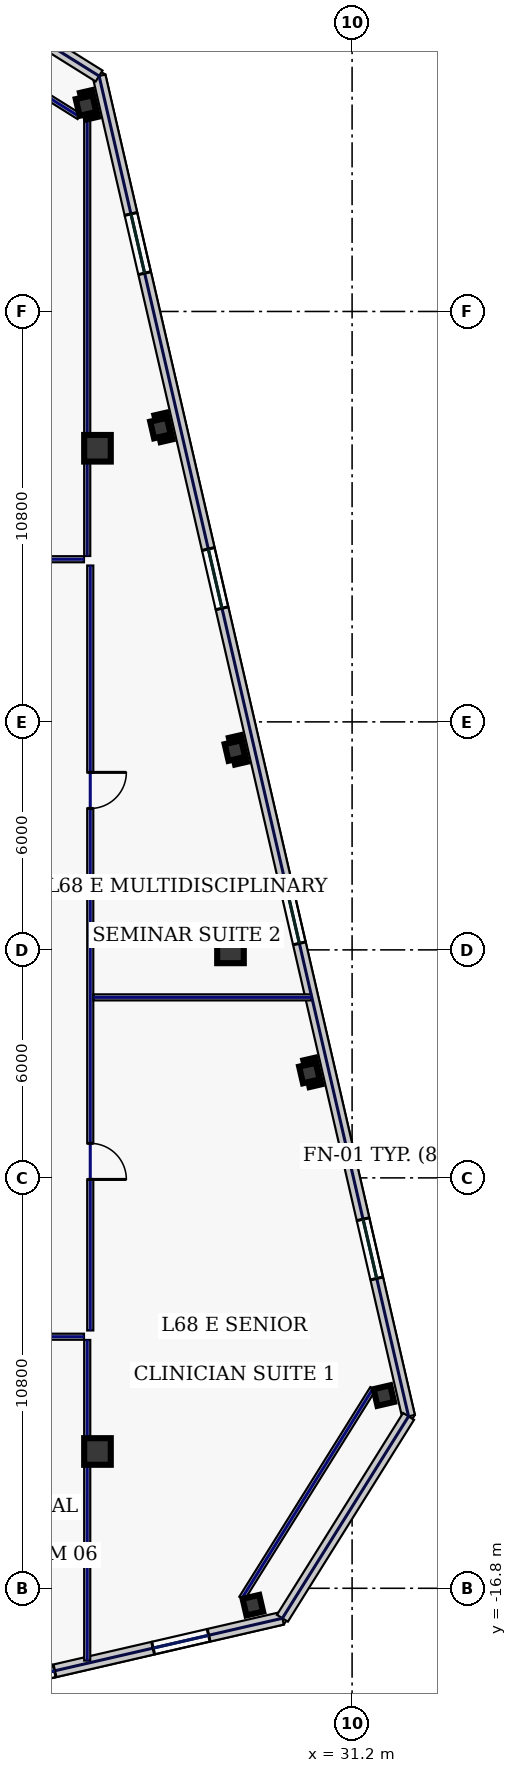
"""IFC4 building model, lengths in metres.
Left out: names, types, materials, properties, quantities, classifications, styles, units other than length and angle.
Written with IfcOpenShell. Run it as: python <this file> out.ifc"""

import sys

from ifc_helpers import new_model, si_unit, direction, frame, frame_2d, origin, origin_2d, place, context, subcontext, project, spatial, rectangle, hollow_rectangle, extrude, element, fill, save


model = new_model("IFC4")
c1 = context("Model", 3, precision=1e-05, world=origin(), true_north=direction((0.0, 1.0)))
c2 = subcontext(c1, "Body", "Model", "MODEL_VIEW")
j1 = project(units=[si_unit("LENGTHUNIT", "METRE"), si_unit("PLANEANGLEUNIT", "RADIAN")], contexts=[c1])
p1 = place(None, origin())
s1 = spatial("IfcSite", under=j1, at=p1, CompositionType="ELEMENT")
p2 = place(p1, origin())
s2 = spatial("IfcBuilding", under=s1, at=p2, CompositionType="ELEMENT")
p3 = place(p2, frame((0.0, 0.0, 293.0)))
s3 = spatial("IfcBuildingStorey", under=s2, at=p3, CompositionType="ELEMENT", Elevation=293.0)
for number, where, z_axis, x_axis in (
    (1, (24.5, -13.2, 0.0), (0.0, 0.0, 1.0), (1.0, 0.0, 0.0)),
    (2, (24.5, 13.2, 0.0), (0.0, 0.0, 1.0), (1.0, 0.0, 0.0)),
    (3, (28.0, 0.0, 0.0), (0.0, 0.0, 1.0), (1.0, 0.0, 0.0)),
):
    element("IfcColumn", number, at=place(p3, frame(where, z_axis=z_axis, x_axis=x_axis)), inside=s3, PredefinedType="COLUMN", context=c2, shape_type="SweptSolid", body=[
        extrude(hollow_rectangle(XDim=0.7, YDim=0.7, WallThickness=0.032, at=origin_2d()), origin(), (0.0, 0.0, 1.0), 3.74),
    ])
for number, where, z_axis, x_axis in (
    (4, (28.589, -17.245, 0.0), (0.0, 0.0, 1.0), (0.974, 0.225, 0.0)),
    (5, (32.036, -11.728, 0.0), (0.0, 0.0, 1.0), (0.974, 0.225, 0.0)),
    (6, (30.077, -3.241, 0.0), (0.0, 0.0, 1.0), (0.974, 0.225, 0.0)),
    (7, (28.117, 5.246, 0.0), (0.0, 0.0, 1.0), (0.974, 0.225, 0.0)),
    (8, (26.158, 13.732, 0.0), (0.0, 0.0, 1.0), (0.974, 0.225, 0.0)),
    (9, (24.198, 22.219, 0.0), (0.0, 0.0, 1.0), (0.974, 0.225, 0.0)),
):
    element("IfcColumn", number, at=place(p3, frame(where, z_axis=z_axis, x_axis=x_axis)), inside=s3, PredefinedType="COLUMN", context=c2, shape_type="SweptSolid", body=[
        extrude(hollow_rectangle(XDim=0.45, YDim=0.45, WallThickness=0.022, at=origin_2d()), origin(), (0.0, 0.0, 1.0), 3.74),
    ])
p4 = place(p3, frame((12.445, -21.495, 0.0), z_axis=(0.0, 0.0, 1.0), x_axis=(0.974369392164, 0.224953967767, 0.0)))
e10 = element("IfcWall", 10, at=p4, inside=s3, PredefinedType="STANDARD", context=c2, shape_type="SweptSolid", body=[
    extrude(rectangle(XDim=17.366, YDim=0.34, at=frame_2d((8.683, 0.0))), origin(), (0.0, 0.0, 1.0), 3.74),
])
p5 = place(p4, frame((2.729, 0.0, 0.9)))
e11 = element("IfcOpeningElement", 11, at=p5, cuts=e10, PredefinedType="OPENING", context=c2, shape_type="SweptSolid", body=[
    extrude(rectangle(XDim=1.5, YDim=2.0, at=frame_2d((0.75, 1.0))), frame((0.0, 0.18, 0.0), z_axis=(0.0, -1.0, 0.0), x_axis=(1.0, 0.0, 0.0)), (0.0, 0.0, 1.0), 0.36),
])
p6 = place(p4, frame((6.24, 0.0, 0.9)))
e12 = element("IfcOpeningElement", 12, at=p6, cuts=e10, PredefinedType="OPENING", context=c2, shape_type="SweptSolid", body=[
    extrude(rectangle(XDim=1.5, YDim=2.0, at=frame_2d((0.75, 1.0))), frame((0.0, 0.18, 0.0), z_axis=(0.0, -1.0, 0.0), x_axis=(1.0, 0.0, 0.0)), (0.0, 0.0, 1.0), 0.36),
])
p7 = place(p4, frame((10.363, 0.0, 0.9)))
e13 = element("IfcOpeningElement", 13, at=p7, cuts=e10, PredefinedType="OPENING", context=c2, shape_type="SweptSolid", body=[
    extrude(rectangle(XDim=0.85, YDim=1.85, at=frame_2d((0.425, 0.925))), frame((0.0, 0.18, 0.0), z_axis=(0.0, -1.0, 0.0), x_axis=(1.0, 0.0, 0.0)), (0.0, 0.0, 1.0), 0.36),
])
p8 = place(p4, frame((13.875, 0.0, 0.9)))
e14 = element("IfcOpeningElement", 14, at=p8, cuts=e10, PredefinedType="OPENING", context=c2, shape_type="SweptSolid", body=[
    extrude(rectangle(XDim=1.5, YDim=2.0, at=frame_2d((0.75, 1.0))), frame((0.0, 0.18, 0.0), z_axis=(0.0, -1.0, 0.0), x_axis=(1.0, 0.0, 0.0)), (0.0, 0.0, 1.0), 0.36),
])
p9 = place(p3, frame((32.686, -12.276, 0.0), z_axis=(0.0, 0.0, 1.0), x_axis=(-0.224953091034, 0.974369594576, 0.0)))
e15 = element("IfcWall", 15, at=p9, inside=s3, PredefinedType="STANDARD", context=c2, shape_type="SweptSolid", body=[
    extrude(rectangle(XDim=36.2, YDim=0.34, at=frame_2d((18.1, 0.0))), origin(), (0.0, 0.0, 1.0), 3.74),
])
p10 = place(p9, frame((3.725, 0.0, 0.58)))
e16 = element("IfcOpeningElement", 16, at=p10, cuts=e15, PredefinedType="OPENING", context=c2, shape_type="SweptSolid", body=[
    extrude(rectangle(XDim=1.6, YDim=2.3, at=frame_2d((0.8, 1.15))), frame((0.0, 0.18, 0.0), z_axis=(0.0, -1.0, 0.0), x_axis=(1.0, 0.0, 0.0)), (0.0, 0.0, 1.0), 0.36),
])
p11 = place(p9, frame((12.775, 0.0, 0.58)))
e17 = element("IfcOpeningElement", 17, at=p11, cuts=e15, PredefinedType="OPENING", context=c2, shape_type="SweptSolid", body=[
    extrude(rectangle(XDim=1.6, YDim=2.3, at=frame_2d((0.8, 1.15))), frame((0.0, 0.18, 0.0), z_axis=(0.0, -1.0, 0.0), x_axis=(1.0, 0.0, 0.0)), (0.0, 0.0, 1.0), 0.36),
])
p12 = place(p9, frame((21.825, 0.0, 0.58)))
e18 = element("IfcOpeningElement", 18, at=p12, cuts=e15, PredefinedType="OPENING", context=c2, shape_type="SweptSolid", body=[
    extrude(rectangle(XDim=1.6, YDim=2.3, at=frame_2d((0.8, 1.15))), frame((0.0, 0.18, 0.0), z_axis=(0.0, -1.0, 0.0), x_axis=(1.0, 0.0, 0.0)), (0.0, 0.0, 1.0), 0.36),
])
p13 = place(p9, frame((30.875, 0.0, 0.58)))
e19 = element("IfcOpeningElement", 19, at=p13, cuts=e15, PredefinedType="OPENING", context=c2, shape_type="SweptSolid", body=[
    extrude(rectangle(XDim=1.6, YDim=2.3, at=frame_2d((0.8, 1.15))), frame((0.0, 0.18, 0.0), z_axis=(0.0, -1.0, 0.0), x_axis=(1.0, 0.0, 0.0)), (0.0, 0.0, 1.0), 0.36),
])
for number, where, z_axis, x_axis in (
    (20, (29.366, -17.589, 0.0), (0.0, 0.0, 1.0), (0.53, 0.848, 0.0)),
    (21, (24.542, 22.996, 0.0), (0.0, 0.0, 1.0), (-0.848, 0.53, 0.0)),
):
    element("IfcWall", number, at=place(p3, frame(where, z_axis=z_axis, x_axis=x_axis)), inside=s3, PredefinedType="STANDARD", context=c2, shape_type="SweptSolid", body=[
        extrude(rectangle(XDim=6.265, YDim=0.34, at=frame_2d((3.132, 0.0))), origin(), (0.0, 0.0, 1.0), 3.74),
    ])
for number, where, z_axis, x_axis in (
    (22, (28.3, -17.065, 0.0), (0.0, 0.0, 1.0), (0.53, 0.848, 0.0)),
    (23, (24.018, 21.931, 0.0), (0.0, 0.0, 1.0), (-0.848, 0.53, 0.0)),
):
    element("IfcWall", number, at=place(p3, frame(where, z_axis=z_axis, x_axis=x_axis)), inside=s3, PredefinedType="PARTITIONING", context=c2, shape_type="SweptSolid", body=[
        extrude(rectangle(XDim=6.505, YDim=0.16, at=frame_2d((3.253, 0.0))), origin(), (0.0, 0.0, 1.0), 3.74),
    ])
p14 = place(p3, frame((-24.145, 10.28, 0.0), z_axis=(0.0, 0.0, 1.0), x_axis=(1.0, 0.0, 0.0)))
e24 = element("IfcWall", 24, at=p14, inside=s3, PredefinedType="PARTITIONING", context=c2, shape_type="SweptSolid", body=[
    extrude(rectangle(XDim=48.29, YDim=0.16, at=frame_2d((24.145, 0.0))), origin(), (0.0, 0.0, 1.0), 3.74),
])
p15 = place(p14, frame((2.044, 0.0, 0.0)))
e25 = element("IfcOpeningElement", 25, at=p15, cuts=e24, PredefinedType="OPENING", context=c2, shape_type="SweptSolid", body=[
    extrude(rectangle(XDim=0.95, YDim=2.2, at=frame_2d((0.475, 1.1))), frame((0.0, 0.09, 0.0), z_axis=(0.0, -1.0, 0.0), x_axis=(1.0, 0.0, 0.0)), (0.0, 0.0, 1.0), 0.18),
])
p16 = place(p14, frame((6.885, 0.0, 0.0)))
e26 = element("IfcOpeningElement", 26, at=p16, cuts=e24, PredefinedType="OPENING", context=c2, shape_type="SweptSolid", body=[
    extrude(rectangle(XDim=0.95, YDim=2.2, at=frame_2d((0.475, 1.1))), frame((0.0, 0.09, 0.0), z_axis=(0.0, -1.0, 0.0), x_axis=(1.0, 0.0, 0.0)), (0.0, 0.0, 1.0), 0.18),
])
p17 = place(p14, frame((14.8, 0.0, 0.0)))
e27 = element("IfcOpeningElement", 27, at=p17, cuts=e24, PredefinedType="OPENING", context=c2, shape_type="SweptSolid", body=[
    extrude(rectangle(XDim=1.3, YDim=2.2, at=frame_2d((0.65, 1.1))), frame((0.0, 0.09, 0.0), z_axis=(0.0, -1.0, 0.0), x_axis=(1.0, 0.0, 0.0)), (0.0, 0.0, 1.0), 0.18),
])
p18 = place(p14, frame((25.58, 0.0, 0.0)))
e28 = element("IfcOpeningElement", 28, at=p18, cuts=e24, PredefinedType="OPENING", context=c2, shape_type="SweptSolid", body=[
    extrude(rectangle(XDim=1.3, YDim=2.2, at=frame_2d((0.65, 1.1))), frame((0.0, 0.09, 0.0), z_axis=(0.0, -1.0, 0.0), x_axis=(1.0, 0.0, 0.0)), (0.0, 0.0, 1.0), 0.18),
])
p19 = place(p14, frame((36.355, 0.0, 0.0)))
e29 = element("IfcOpeningElement", 29, at=p19, cuts=e24, PredefinedType="OPENING", context=c2, shape_type="SweptSolid", body=[
    extrude(rectangle(XDim=0.95, YDim=2.2, at=frame_2d((0.475, 1.1))), frame((0.0, 0.09, 0.0), z_axis=(0.0, -1.0, 0.0), x_axis=(1.0, 0.0, 0.0)), (0.0, 0.0, 1.0), 0.18),
])
p20 = place(p14, frame((44.401, 0.0, 0.0)))
e30 = element("IfcOpeningElement", 30, at=p20, cuts=e24, PredefinedType="OPENING", context=c2, shape_type="SweptSolid", body=[
    extrude(rectangle(XDim=1.3, YDim=2.2, at=frame_2d((0.65, 1.1))), frame((0.0, 0.09, 0.0), z_axis=(0.0, -1.0, 0.0), x_axis=(1.0, 0.0, 0.0)), (0.0, 0.0, 1.0), 0.18),
])
p21 = place(p3, frame((24.31, 10.115, 0.0), z_axis=(0.0, 0.0, 1.0), x_axis=(0.0, -1.0, 0.0)))
e31 = element("IfcWall", 31, at=p21, inside=s3, PredefinedType="PARTITIONING", context=c2, shape_type="SweptSolid", body=[
    extrude(rectangle(XDim=20.13, YDim=0.16, at=frame_2d((10.065, 0.0))), origin(), (0.0, 0.0, 1.0), 3.74),
])
p22 = place(p21, frame((15.206, 0.0, 0.0)))
e32 = element("IfcOpeningElement", 32, at=p22, cuts=e31, PredefinedType="OPENING", context=c2, shape_type="SweptSolid", body=[
    extrude(rectangle(XDim=0.95, YDim=2.2, at=frame_2d((0.475, 1.1))), frame((0.0, 0.09, 0.0), z_axis=(0.0, -1.0, 0.0), x_axis=(1.0, 0.0, 0.0)), (0.0, 0.0, 1.0), 0.18),
])
p23 = place(p21, frame((5.444, 0.0, 0.0)))
e33 = element("IfcOpeningElement", 33, at=p23, cuts=e31, PredefinedType="OPENING", context=c2, shape_type="SweptSolid", body=[
    extrude(rectangle(XDim=0.95, YDim=2.2, at=frame_2d((0.475, 1.1))), frame((0.0, 0.09, 0.0), z_axis=(0.0, -1.0, 0.0), x_axis=(1.0, 0.0, 0.0)), (0.0, 0.0, 1.0), 0.18),
])
p24 = place(p3, frame((24.145, -10.18, 0.0), z_axis=(0.0, 0.0, 1.0), x_axis=(-1.0, 0.0, 0.0)))
e34 = element("IfcWall", 34, at=p24, inside=s3, PredefinedType="PARTITIONING", context=c2, shape_type="SweptSolid", body=[
    extrude(rectangle(XDim=9.08, YDim=0.16, at=frame_2d((4.54, 0.0))), origin(), (0.0, 0.0, 1.0), 3.74),
])
p25 = place(p24, frame((2.934, 0.0, 0.0)))
e35 = element("IfcOpeningElement", 35, at=p25, cuts=e34, PredefinedType="OPENING", context=c2, shape_type="SweptSolid", body=[
    extrude(rectangle(XDim=0.95, YDim=2.2, at=frame_2d((0.475, 1.1))), frame((0.0, 0.09, 0.0), z_axis=(0.0, -1.0, 0.0), x_axis=(1.0, 0.0, 0.0)), (0.0, 0.0, 1.0), 0.18),
])
p26 = place(p3, frame((24.23, 10.365, 0.0), z_axis=(0.0, 0.0, 1.0), x_axis=(0.0, 1.0, 0.0)))
e36 = element("IfcWall", 36, at=p26, inside=s3, PredefinedType="PARTITIONING", context=c2, shape_type="SweptSolid", body=[
    extrude(rectangle(XDim=12.206, YDim=0.16, at=frame_2d((6.103, 0.0))), origin(), (0.0, 0.0, 1.0), 3.185),
])
p27 = place(p3, frame((24.23, -18.703, 0.0), z_axis=(0.0, 0.0, 1.0), x_axis=(0.0, 1.0, 0.0)))
e37 = element("IfcWall", 37, at=p27, inside=s3, PredefinedType="PARTITIONING", context=c2, shape_type="SweptSolid", body=[
    extrude(rectangle(XDim=8.438, YDim=0.16, at=frame_2d((4.219, 0.0))), origin(), (0.0, 0.0, 1.0), 3.74),
])
p28 = place(p3, frame((24.395, -1.25, 0.0), z_axis=(0.0, 0.0, 1.0), x_axis=(1.0, 0.0, 0.0)))
e38 = element("IfcWall", 38, at=p28, inside=s3, PredefinedType="PARTITIONING", context=c2, shape_type="SweptSolid", body=[
    extrude(rectangle(XDim=5.725, YDim=0.16, at=frame_2d((2.862, 0.0))), origin(), (0.0, 0.0, 1.0), 3.74),
])
p29 = place(p7, origin())
e39 = element("IfcWindow", 39, at=p29, inside=s3, PartitioningType="SINGLE_PANEL", PredefinedType="WINDOW", context=c2, shape_type="SweptSolid", body=[
    extrude(rectangle(XDim=0.85, YDim=1.85, at=frame_2d((0.425, 0.925))), frame((0.0, 0.03, 0.0), z_axis=(0.0, -1.0, 0.0), x_axis=(1.0, 0.0, 0.0)), (0.0, 0.0, 1.0), 0.06),
])
fill(e13, e39)
p30 = place(p8, origin())
e40 = element("IfcWindow", 40, at=p30, inside=s3, PartitioningType="SINGLE_PANEL", PredefinedType="WINDOW", context=c2, shape_type="SweptSolid", body=[
    extrude(rectangle(XDim=1.5, YDim=2.0, at=frame_2d((0.75, 1.0))), frame((0.0, 0.03, 0.0), z_axis=(0.0, -1.0, 0.0), x_axis=(1.0, 0.0, 0.0)), (0.0, 0.0, 1.0), 0.06),
])
fill(e14, e40)
p31 = place(p10, origin())
e41 = element("IfcWindow", 41, at=p31, inside=s3, PartitioningType="SINGLE_PANEL", PredefinedType="WINDOW", context=c2, shape_type="SweptSolid", body=[
    extrude(rectangle(XDim=1.6, YDim=2.3, at=frame_2d((0.8, 1.15))), frame((0.0, 0.03, 0.0), z_axis=(0.0, -1.0, 0.0), x_axis=(1.0, 0.0, 0.0)), (0.0, 0.0, 1.0), 0.06),
])
fill(e16, e41)
p32 = place(p11, origin())
e42 = element("IfcWindow", 42, at=p32, inside=s3, PartitioningType="SINGLE_PANEL", PredefinedType="WINDOW", context=c2, shape_type="SweptSolid", body=[
    extrude(rectangle(XDim=1.6, YDim=2.3, at=frame_2d((0.8, 1.15))), frame((0.0, 0.03, 0.0), z_axis=(0.0, -1.0, 0.0), x_axis=(1.0, 0.0, 0.0)), (0.0, 0.0, 1.0), 0.06),
])
fill(e17, e42)
p33 = place(p12, origin())
e43 = element("IfcWindow", 43, at=p33, inside=s3, PartitioningType="SINGLE_PANEL", PredefinedType="WINDOW", context=c2, shape_type="SweptSolid", body=[
    extrude(rectangle(XDim=1.6, YDim=2.3, at=frame_2d((0.8, 1.15))), frame((0.0, 0.03, 0.0), z_axis=(0.0, -1.0, 0.0), x_axis=(1.0, 0.0, 0.0)), (0.0, 0.0, 1.0), 0.06),
])
fill(e18, e43)
p34 = place(p13, origin())
e44 = element("IfcWindow", 44, at=p34, inside=s3, PartitioningType="SINGLE_PANEL", PredefinedType="WINDOW", context=c2, shape_type="SweptSolid", body=[
    extrude(rectangle(XDim=1.6, YDim=2.3, at=frame_2d((0.8, 1.15))), frame((0.0, 0.03, 0.0), z_axis=(0.0, -1.0, 0.0), x_axis=(1.0, 0.0, 0.0)), (0.0, 0.0, 1.0), 0.06),
])
fill(e19, e44)
p35 = place(p22, origin())
e45 = element("IfcDoor", 45, at=p35, inside=s3, OperationType="SINGLE_SWING_RIGHT", PredefinedType="DOOR", context=c2, shape_type="SweptSolid", body=[
    extrude(rectangle(XDim=0.95, YDim=2.2, at=frame_2d((0.475, 1.1))), frame((0.0, 0.025, 0.0), z_axis=(0.0, -1.0, 0.0), x_axis=(1.0, 0.0, 0.0)), (0.0, 0.0, 1.0), 0.05),
])
fill(e32, e45)
p36 = place(p23, origin())
e46 = element("IfcDoor", 46, at=p36, inside=s3, OperationType="SINGLE_SWING_LEFT", PredefinedType="DOOR", context=c2, shape_type="SweptSolid", body=[
    extrude(rectangle(XDim=0.95, YDim=2.2, at=frame_2d((0.475, 1.1))), frame((0.0, 0.025, 0.0), z_axis=(0.0, -1.0, 0.0), x_axis=(1.0, 0.0, 0.0)), (0.0, 0.0, 1.0), 0.05),
])
fill(e33, e46)
save(model, sys.argv[1])
